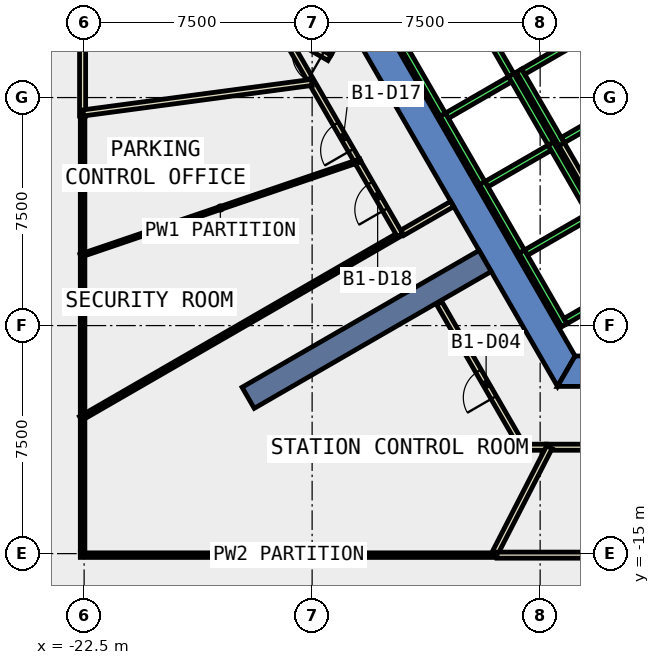
"""IFC4 building model, lengths in metres.
Left out: names, types, materials, properties, quantities, classifications, styles, units other than length and angle.
Written with IfcOpenShell. Run it as: python <this file> out.ifc"""

import sys

from ifc_helpers import new_model, si_unit, direction, frame, frame_2d, origin, place, context, subcontext, project, spatial, polyline, rectangle, outline, extrude, element, fill, save


model = new_model("IFC4")
c1 = context("Model", 3, precision=1e-05, world=origin(), true_north=direction((0.0, 1.0)))
c2 = subcontext(c1, "Body", "Model", "MODEL_VIEW")
j1 = project(units=[si_unit("LENGTHUNIT", "METRE"), si_unit("PLANEANGLEUNIT", "RADIAN")], contexts=[c1])
p1 = place(None, origin())
s1 = spatial("IfcSite", under=j1, at=p1, CompositionType="ELEMENT")
p2 = place(p1, origin())
s2 = spatial("IfcBuilding", under=s1, at=p2, CompositionType="ELEMENT")
p3 = place(p2, frame((0.0, 0.0, -5.5)))
s3 = spatial("IfcBuildingStorey", under=s2, at=p3, CompositionType="ELEMENT", Elevation=-5.5)
p4 = place(p3, frame((0.0, 0.0, -0.42)))
e1 = element("IfcWall", 1, at=p4, inside=s3, PredefinedType="SHEAR", context=c2, shape_type="SweptSolid", body=[
    extrude(outline(polyline([(-13.856, 2.5), (-6.928, -9.5), (-6.351, -8.5), (-12.702, 2.5), (-13.856, 2.5)])), origin(), (0.0, 0.0, 1.0), 5.42),
])
p5 = place(p3, frame((0.0, 0.0, -0.42)))
e2 = element("IfcWall", 2, at=p5, inside=s3, PredefinedType="SHEAR", context=c2, shape_type="SweptSolid", body=[
    extrude(outline(polyline([(3.75, -9.5), (3.75, -8.5), (-6.351, -8.5), (-6.928, -9.5), (3.75, -9.5)])), origin(), (0.0, 0.0, 1.0), 5.42),
])
p6 = place(p3, frame((-9.31, -5.375, -0.42), z_axis=(0.0, 0.0, 1.0), x_axis=(-0.866017533419, -0.500013631625, 0.0)))
e3 = element("IfcWall", 3, at=p6, inside=s3, PredefinedType="SHEAR", context=c2, shape_type="SweptSolid", body=[
    extrude(rectangle(XDim=9.0, YDim=0.8, at=frame_2d((4.5, 0.0))), origin(), (0.0, 0.0, 1.0), 5.42),
])
p7 = place(p3, frame((-7.296, -11.5, 0.0), z_axis=(0.0, 0.0, 1.0), x_axis=(-1.0, 0.0, 0.0)))
e4 = element("IfcWall", 4, at=p7, inside=s3, PredefinedType="PARTITIONING", context=c2, shape_type="SweptSolid", body=[
    extrude(rectangle(XDim=0.687, YDim=0.2, at=frame_2d((0.344, 0.0))), origin(), (0.0, 0.0, 1.0), 4.9),
])
p8 = place(p3, frame((-8.033, -11.587, 0.0), z_axis=(0.0, 0.0, 1.0), x_axis=(-0.499991937534, 0.866030058601, 0.0)))
e5 = element("IfcWall", 5, at=p8, inside=s3, PredefinedType="PARTITIONING", context=c2, shape_type="SweptSolid", body=[
    extrude(rectangle(XDim=5.568, YDim=0.2, at=frame_2d((2.784, 0.0))), origin(), (0.0, 0.0, 1.0), 4.9),
])
p9 = place(p8, frame((1.988, 0.0, 0.0)))
e6 = element("IfcOpeningElement", 6, at=p9, cuts=e5, PredefinedType="OPENING", context=c2, shape_type="SweptSolid", body=[
    extrude(rectangle(XDim=1.0, YDim=2.1, at=frame_2d((0.5, 1.05))), frame((0.0, 0.11, 0.0), z_axis=(0.0, -1.0, 0.0), x_axis=(1.0, 0.0, 0.0)), (0.0, 0.0, 1.0), 0.22),
])
p10 = place(p3, frame((1.35, -11.5, 0.0), z_axis=(0.0, 0.0, 1.0), x_axis=(-1.0, 0.0, 0.0)))
e7 = element("IfcWall", 7, at=p10, inside=s3, PredefinedType="PARTITIONING", context=c2, shape_type="SweptSolid", body=[
    extrude(rectangle(XDim=8.646, YDim=0.2, at=frame_2d((4.323, 0.0))), origin(), (0.0, 0.0, 1.0), 4.9),
])
p11 = place(p10, frame((3.718, 0.0, 0.0)))
e8 = element("IfcOpeningElement", 8, at=p11, cuts=e7, PredefinedType="OPENING", context=c2, shape_type="SweptSolid", body=[
    extrude(rectangle(XDim=1.0, YDim=2.1, at=frame_2d((0.5, 1.05))), frame((0.0, 0.11, 0.0), z_axis=(0.0, -1.0, 0.0), x_axis=(1.0, 0.0, 0.0)), (0.0, 0.0, 1.0), 0.22),
])
p12 = place(p3, frame((-7.196, -11.5, 0.0), z_axis=(0.0, 0.0, 1.0), x_axis=(-0.456975104855, -0.889479484611, 0.0)))
e9 = element("IfcWall", 9, at=p12, inside=s3, PredefinedType="PARTITIONING", context=c2, shape_type="SweptSolid", body=[
    extrude(rectangle(XDim=3.891, YDim=0.2, at=frame_2d((1.945, 0.0))), origin(), (0.0, 0.0, 1.0), 4.9),
])
p13 = place(p3, frame((-8.92, -15.05, 0.0), z_axis=(0.0, 0.0, 1.0), x_axis=(-1.0, 0.0, 0.0)))
e10 = element("IfcWall", 10, at=p13, inside=s3, PredefinedType="PARTITIONING", context=c2, shape_type="SweptSolid", body=[
    extrude(rectangle(XDim=13.705, YDim=0.15, at=frame_2d((6.853, 0.0))), origin(), (0.0, 0.0, 1.0), 4.9),
])
p14 = place(p3, frame((-22.55, -14.975, 0.0), z_axis=(0.0, 0.0, 1.0), x_axis=(0.0, 1.0, 0.0)))
e11 = element("IfcWall", 11, at=p14, inside=s3, PredefinedType="PARTITIONING", context=c2, shape_type="SweptSolid", body=[
    extrude(rectangle(XDim=4.381, YDim=0.15, at=frame_2d((2.19, 0.0))), origin(), (0.0, 0.0, 1.0), 4.9),
])
p15 = place(p3, frame((-12.037, -4.45, 0.0), z_axis=(0.0, 0.0, 1.0), x_axis=(0.865980106173, 0.500078449558, 0.0)))
e12 = element("IfcWall", 12, at=p15, inside=s3, PredefinedType="PARTITIONING", context=c2, shape_type="SweptSolid", body=[
    extrude(rectangle(XDim=1.9, YDim=0.2, at=frame_2d((0.95, 0.0))), origin(), (0.0, 0.0, 1.0), 4.9),
])
p16 = place(p3, frame((-22.615, -10.556, 0.0), z_axis=(0.0, 0.0, 1.0), x_axis=(0.866067424309, 0.499927211253, 0.0)))
e13 = element("IfcWall", 13, at=p16, inside=s3, PredefinedType="PARTITIONING", context=c2, shape_type="SweptSolid", body=[
    extrude(rectangle(XDim=12.214, YDim=0.15, at=frame_2d((6.107, 0.0))), origin(), (0.0, 0.0, 1.0), 4.9),
])
p17 = place(p3, frame((1.619, -15.05, 0.0), z_axis=(0.0, 0.0, 1.0), x_axis=(-1.0, 0.0, 0.0)))
e14 = element("IfcWall", 14, at=p17, inside=s3, PredefinedType="PARTITIONING", context=c2, shape_type="SweptSolid", body=[
    extrude(rectangle(XDim=10.539, YDim=0.2, at=frame_2d((5.27, 0.0))), origin(), (0.0, 0.0, 1.0), 4.9),
])
p18 = place(p3, frame((-22.55, -0.608, 0.0), z_axis=(0.0, 0.0, 1.0), x_axis=(0.0, 1.0, 0.0)))
e15 = element("IfcWall", 15, at=p18, inside=s3, PredefinedType="PARTITIONING", context=c2, shape_type="SweptSolid", body=[
    extrude(rectangle(XDim=13.439, YDim=0.2, at=frame_2d((6.719, 0.0))), origin(), (0.0, 0.0, 1.0), 4.9),
])
p19 = place(p18, frame((3.93, 0.0, 0.0)))
e16 = element("IfcOpeningElement", 16, at=p19, cuts=e15, PredefinedType="OPENING", context=c2, shape_type="SweptSolid", body=[
    extrude(rectangle(XDim=1.8, YDim=2.1, at=frame_2d((0.9, 1.05))), frame((0.0, 0.11, 0.0), z_axis=(0.0, -1.0, 0.0), x_axis=(1.0, 0.0, 0.0)), (0.0, 0.0, 1.0), 0.22),
])
p20 = place(p3, frame((-22.55, -5.126, 0.0), z_axis=(0.0, 0.0, 1.0), x_axis=(0.0, 1.0, 0.0)))
e17 = element("IfcWall", 17, at=p20, inside=s3, PredefinedType="PARTITIONING", context=c2, shape_type="SweptSolid", body=[
    extrude(rectangle(XDim=4.518, YDim=0.15, at=frame_2d((2.259, 0.0))), origin(), (0.0, 0.0, 1.0), 4.9),
])
p21 = place(p3, frame((-22.55, -10.444, 0.0), z_axis=(0.0, 0.0, 1.0), x_axis=(0.0, 1.0, 0.0)))
e18 = element("IfcWall", 18, at=p21, inside=s3, PredefinedType="PARTITIONING", context=c2, shape_type="SweptSolid", body=[
    extrude(rectangle(XDim=5.218, YDim=0.15, at=frame_2d((2.609, 0.0))), origin(), (0.0, 0.0, 1.0), 4.9),
])
p22 = place(p3, frame((-13.856, 2.5, 0.0), z_axis=(0.0, 0.0, 1.0), x_axis=(-0.500114474492, -0.865959301817, 0.0)))
e19 = element("IfcWall", 19, at=p22, inside=s3, PredefinedType="PARTITIONING", context=c2, shape_type="SweptSolid", body=[
    extrude(rectangle(XDim=1.222, YDim=0.2, at=frame_2d((0.611, 0.0))), origin(), (0.0, 0.0, 1.0), 4.9),
])
p23 = place(p3, frame((-14.43, 1.305, 0.0), z_axis=(0.0, 0.0, 1.0), x_axis=(-0.866000389056, 0.500043324278, 0.0)))
e20 = element("IfcWall", 20, at=p23, inside=s3, PredefinedType="PARTITIONING", context=c2, shape_type="SweptSolid", body=[
    extrude(rectangle(XDim=1.91, YDim=0.2, at=frame_2d((0.955, 0.0))), origin(), (0.0, 0.0, 1.0), 4.9),
])
p24 = place(p23, frame((0.254, 0.0, 0.0)))
e21 = element("IfcOpeningElement", 21, at=p24, cuts=e20, PredefinedType="OPENING", context=c2, shape_type="SweptSolid", body=[
    extrude(rectangle(XDim=1.0, YDim=2.1, at=frame_2d((0.5, 1.05))), frame((0.0, 0.11, 0.0), z_axis=(0.0, -1.0, 0.0), x_axis=(1.0, 0.0, 0.0)), (0.0, 0.0, 1.0), 0.22),
])
p25 = place(p3, frame((-13.485, -2.142, 0.0), z_axis=(0.0, 0.0, 1.0), x_axis=(-0.500042049778, 0.866001124973, 0.0)))
e22 = element("IfcWall", 22, at=p25, inside=s3, PredefinedType="PARTITIONING", context=c2, shape_type="SweptSolid", body=[
    extrude(rectangle(XDim=5.025, YDim=0.2, at=frame_2d((2.513, 0.0))), origin(), (0.0, 0.0, 1.0), 4.9),
])
p26 = place(p25, frame((0.47, 0.0, 0.0)))
e23 = element("IfcOpeningElement", 23, at=p26, cuts=e22, PredefinedType="OPENING", context=c2, shape_type="SweptSolid", body=[
    extrude(rectangle(XDim=1.0, YDim=2.1, at=frame_2d((0.5, 1.05))), frame((0.0, 0.11, 0.0), z_axis=(0.0, -1.0, 0.0), x_axis=(1.0, 0.0, 0.0)), (0.0, 0.0, 1.0), 0.22),
])
p27 = place(p3, frame((-12.111, -4.522, 0.0), z_axis=(0.0, 0.0, 1.0), x_axis=(-0.499999305434, 0.866025804792, 0.0)))
e24 = element("IfcWall", 24, at=p27, inside=s3, PredefinedType="PARTITIONING", context=c2, shape_type="SweptSolid", body=[
    extrude(rectangle(XDim=2.748, YDim=0.2, at=frame_2d((1.374, 0.0))), origin(), (0.0, 0.0, 1.0), 4.9),
])
p28 = place(p27, frame((0.968, 0.0, 0.0)))
e25 = element("IfcOpeningElement", 25, at=p28, cuts=e24, PredefinedType="OPENING", context=c2, shape_type="SweptSolid", body=[
    extrude(rectangle(XDim=1.0, YDim=2.1, at=frame_2d((0.5, 1.05))), frame((0.0, 0.11, 0.0), z_axis=(0.0, -1.0, 0.0), x_axis=(1.0, 0.0, 0.0)), (0.0, 0.0, 1.0), 0.22),
])
p29 = place(p3, frame((-15.01, 0.498, 0.0), z_axis=(0.0, 0.0, 1.0), x_axis=(-0.991211581173, -0.132286058785, 0.0)))
e26 = element("IfcWall", 26, at=p29, inside=s3, PredefinedType="PARTITIONING", context=c2, shape_type="SweptSolid", body=[
    extrude(rectangle(XDim=7.582, YDim=0.2, at=frame_2d((3.791, 0.0))), origin(), (0.0, 0.0, 1.0), 4.9),
])
p30 = place(p3, frame((-13.416, -2.067, 0.0), z_axis=(0.0, 0.0, 1.0), x_axis=(-0.946668320361, -0.3222097007, 0.0)))
e27 = element("IfcWall", 27, at=p30, inside=s3, PredefinedType="PARTITIONING", context=c2, shape_type="SweptSolid", body=[
    extrude(rectangle(XDim=9.724, YDim=0.1, at=frame_2d((4.862, 0.0))), origin(), (0.0, 0.0, 1.0), 4.9),
])
p31 = place(p3, frame((-5.492, -3.788, 0.0), z_axis=(0.0, 0.0, 1.0), x_axis=(-0.500008949224, 0.866020236886, 0.0)))
e28 = element("IfcWall", 28, at=p31, inside=s3, PredefinedType="PARTITIONING", context=c2, shape_type="SweptSolid", body=[
    extrude(rectangle(XDim=2.68, YDim=0.2, at=frame_2d((1.34, 0.0))), origin(), (0.0, 0.0, 1.0), 4.9),
])
p32 = place(p3, frame((-8.192, 0.888, 0.0), z_axis=(0.0, 0.0, 1.0), x_axis=(0.49994636267, -0.866056369097, 0.0)))
e29 = element("IfcWall", 29, at=p32, inside=s3, PredefinedType="STANDARD", context=c2, shape_type="SweptSolid", body=[
    extrude(rectangle(XDim=2.8, YDim=0.2, at=frame_2d((1.4, 0.0))), origin(), (0.0, 0.0, 1.0), 4.9),
])
for number, where, z_axis, x_axis in (
    (30, (-5.977, 2.052, 0.0), (0.0, 0.0, 1.0), (-0.866, -0.5, 0.0)),
    (31, (-4.677, -0.2, 0.0), (0.0, 0.0, 1.0), (-0.866, -0.5, 0.0)),
):
    element("IfcWall", number, at=place(p3, frame(where, z_axis=z_axis, x_axis=x_axis)), inside=s3, PredefinedType="STANDARD", context=c2, shape_type="SweptSolid", body=[
        extrude(rectangle(XDim=2.399, YDim=0.2, at=frame_2d((1.2, 0.0))), origin(), (0.0, 0.0, 1.0), 4.9),
    ])
for number, where, z_axis, x_axis in (
    (32, (-9.751, 2.99, 0.0), (0.0, 0.0, 1.0), (0.5, -0.866, 0.0)),
    (33, (-12.003, 1.69, 0.0), (0.0, 0.0, 1.0), (0.5, -0.866, 0.0)),
):
    element("IfcWall", number, at=place(p3, frame(where, z_axis=z_axis, x_axis=x_axis)), inside=s3, PredefinedType="STANDARD", context=c2, shape_type="SweptSolid", body=[
        extrude(rectangle(XDim=2.8, YDim=0.2, at=frame_2d((1.4, 0.0))), origin(), (0.0, 0.0, 1.0), 3.6),
    ])
p33 = place(p3, frame((-8.488, 0.602, 0.0), z_axis=(0.0, 0.0, 1.0), x_axis=(-0.865973769406, -0.500089422704, 0.0)))
e34 = element("IfcWall", 34, at=p33, inside=s3, PredefinedType="STANDARD", context=c2, shape_type="SweptSolid", body=[
    extrude(rectangle(XDim=2.399, YDim=0.2, at=frame_2d((1.2, 0.0))), origin(), (0.0, 0.0, 1.0), 3.6),
])
for number, where, z_axis, x_axis in (
    (35, (-8.451, 0.738, 0.0), (0.0, 0.0, 1.0), (0.5, -0.866, 0.0)),
    (36, (-10.703, -0.562, 0.0), (0.0, 0.0, 1.0), (0.5, -0.866, 0.0)),
):
    element("IfcWall", number, at=place(p3, frame(where, z_axis=z_axis, x_axis=x_axis)), inside=s3, PredefinedType="STANDARD", context=c2, shape_type="SweptSolid", body=[
        extrude(rectangle(XDim=2.8, YDim=0.2, at=frame_2d((1.4, 0.0))), origin(), (0.0, 0.0, 1.0), 3.6),
    ])
p34 = place(p3, frame((-7.188, -1.65, 0.0), z_axis=(0.0, 0.0, 1.0), x_axis=(-0.865955154139, -0.50012165622, 0.0)))
e37 = element("IfcWall", 37, at=p34, inside=s3, PredefinedType="STANDARD", context=c2, shape_type="SweptSolid", body=[
    extrude(rectangle(XDim=2.4, YDim=0.2, at=frame_2d((1.2, 0.0))), origin(), (0.0, 0.0, 1.0), 3.6),
])
p35 = place(p3, frame((-7.151, -1.513, 0.0), z_axis=(0.0, 0.0, 1.0), x_axis=(0.49994636267, -0.866056369097, 0.0)))
e38 = element("IfcWall", 38, at=p35, inside=s3, PredefinedType="STANDARD", context=c2, shape_type="SweptSolid", body=[
    extrude(rectangle(XDim=2.8, YDim=0.2, at=frame_2d((1.4, 0.0))), origin(), (0.0, 0.0, 1.0), 3.6),
])
p36 = place(p3, frame((-9.403, -2.813, 0.0), z_axis=(0.0, 0.0, 1.0), x_axis=(0.500011755427, -0.866018616679, 0.0)))
e39 = element("IfcWall", 39, at=p36, inside=s3, PredefinedType="STANDARD", context=c2, shape_type="SweptSolid", body=[
    extrude(rectangle(XDim=2.8, YDim=0.2, at=frame_2d((1.4, 0.0))), origin(), (0.0, 0.0, 1.0), 3.6),
])
p37 = place(p3, frame((-5.888, -3.902, 0.0), z_axis=(0.0, 0.0, 1.0), x_axis=(-0.865999212041, -0.500045362686, 0.0)))
e40 = element("IfcWall", 40, at=p37, inside=s3, PredefinedType="STANDARD", context=c2, shape_type="SweptSolid", body=[
    extrude(rectangle(XDim=2.4, YDim=0.2, at=frame_2d((1.2, 0.0))), origin(), (0.0, 0.0, 1.0), 3.6),
])
p38 = place(p3, frame((-8.103, -5.065, 0.0), z_axis=(0.0, 0.0, 1.0), x_axis=(0.500011755427, -0.866018616679, 0.0)))
e41 = element("IfcWall", 41, at=p38, inside=s3, PredefinedType="STANDARD", context=c2, shape_type="SweptSolid", body=[
    extrude(rectangle(XDim=2.8, YDim=0.2, at=frame_2d((1.4, 0.0))), origin(), (0.0, 0.0, 1.0), 3.6),
])
p39 = place(p3, frame((-4.588, -6.153, 0.0), z_axis=(0.0, 0.0, 1.0), x_axis=(-0.865999212041, -0.500045362686, 0.0)))
e42 = element("IfcWall", 42, at=p39, inside=s3, PredefinedType="STANDARD", context=c2, shape_type="SweptSolid", body=[
    extrude(rectangle(XDim=2.4, YDim=0.2, at=frame_2d((1.2, 0.0))), origin(), (0.0, 0.0, 1.0), 3.6),
])
p40 = place(p9, origin())
e43 = element("IfcDoor", 43, at=p40, inside=s3, OperationType="SINGLE_SWING_RIGHT", PredefinedType="DOOR", context=c2, shape_type="SweptSolid", body=[
    extrude(rectangle(XDim=1.0, YDim=2.1, at=frame_2d((0.5, 1.05))), frame((0.0, 0.025, 0.0), z_axis=(0.0, -1.0, 0.0), x_axis=(1.0, 0.0, 0.0)), (0.0, 0.0, 1.0), 0.05),
])
fill(e6, e43)
p41 = place(p24, origin())
e44 = element("IfcDoor", 44, at=p41, inside=s3, OperationType="SINGLE_SWING_RIGHT", PredefinedType="DOOR", context=c2, shape_type="SweptSolid", body=[
    extrude(rectangle(XDim=1.0, YDim=2.1, at=frame_2d((0.5, 1.05))), frame((0.0, 0.025, 0.0), z_axis=(0.0, -1.0, 0.0), x_axis=(1.0, 0.0, 0.0)), (0.0, 0.0, 1.0), 0.05),
])
fill(e21, e44)
p42 = place(p26, origin())
e45 = element("IfcDoor", 45, at=p42, inside=s3, OperationType="SINGLE_SWING_LEFT", PredefinedType="DOOR", context=c2, shape_type="SweptSolid", body=[
    extrude(rectangle(XDim=1.0, YDim=2.1, at=frame_2d((0.5, 1.05))), frame((0.0, 0.025, 0.0), z_axis=(0.0, -1.0, 0.0), x_axis=(1.0, 0.0, 0.0)), (0.0, 0.0, 1.0), 0.05),
])
fill(e23, e45)
p43 = place(p28, origin())
e46 = element("IfcDoor", 46, at=p43, inside=s3, OperationType="SINGLE_SWING_RIGHT", PredefinedType="DOOR", context=c2, shape_type="SweptSolid", body=[
    extrude(rectangle(XDim=1.0, YDim=2.1, at=frame_2d((0.5, 1.05))), frame((0.0, 0.025, 0.0), z_axis=(0.0, -1.0, 0.0), x_axis=(1.0, 0.0, 0.0)), (0.0, 0.0, 1.0), 0.05),
])
fill(e25, e46)
save(model, sys.argv[1])
